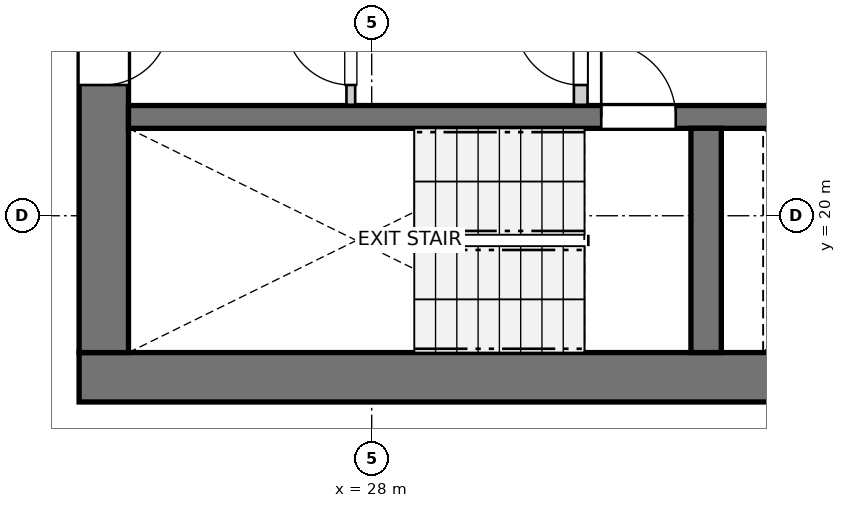
"""IFC4 building model, lengths in metres.
Left out: names, types, materials, properties, quantities, classifications, styles, units other than length and angle.
Written with IfcOpenShell. Run it as: python <this file> out.ifc"""

import sys

from ifc_helpers import new_model, si_unit, direction, frame, frame_2d, origin, place, context, subcontext, project, spatial, rectangle, extrude, source, transform, mapped, element, fill, save


model = new_model("IFC4")
c1 = context("Model", 3, precision=1e-05, world=origin(), true_north=direction((0.0, 1.0)))
c2 = subcontext(c1, "Body", "Model", "MODEL_VIEW")
j1 = project(units=[si_unit("LENGTHUNIT", "METRE"), si_unit("PLANEANGLEUNIT", "RADIAN")], contexts=[c1])
p1 = place(None, origin())
s1 = spatial("IfcSite", under=j1, at=p1, CompositionType="ELEMENT")
p2 = place(p1, origin())
s2 = spatial("IfcBuilding", under=s1, at=p2, CompositionType="ELEMENT")
p3 = place(p2, frame((0.0, 0.0, 86.4)))
s3 = spatial("IfcBuildingStorey", under=s2, at=p3, CompositionType="ELEMENT", Elevation=86.4)
p4 = place(p3, frame((24.15, 17.875, 0.0), z_axis=(0.0, 0.0, 1.0), x_axis=(1.0, 0.0, 0.0)))
e1 = element("IfcWall", 1, at=p4, inside=s3, PredefinedType="SHEAR", context=c2, shape_type="SweptSolid", body=[
    extrude(rectangle(XDim=12.4, YDim=0.65, at=frame_2d((6.2, 0.0))), origin(), (0.0, 0.0, 1.0), 2.95),
])
p5 = place(p3, frame((24.475, 33.8, 0.0), z_axis=(0.0, 0.0, 1.0), x_axis=(0.0, -1.0, 0.0)))
e2 = element("IfcWall", 2, at=p5, inside=s3, PredefinedType="SHEAR", context=c2, shape_type="SweptSolid", body=[
    extrude(rectangle(XDim=15.6, YDim=0.65, at=frame_2d((7.8, 0.0))), origin(), (0.0, 0.0, 1.0), 2.95),
])
p6 = place(p5, frame((7.05, 0.0, 0.0)))
e3 = element("IfcOpeningElement", 3, at=p6, cuts=e2, PredefinedType="OPENING", context=c2, shape_type="SweptSolid", body=[
    extrude(rectangle(XDim=1.5, YDim=2.15, at=frame_2d((0.75, 1.075))), frame((0.0, 0.335, 0.0), z_axis=(0.0, -1.0, 0.0), x_axis=(1.0, 0.0, 0.0)), (0.0, 0.0, 1.0), 0.67),
])
p7 = place(p5, frame((3.52, 0.0, 0.0)))
e4 = element("IfcOpeningElement", 4, at=p7, cuts=e2, PredefinedType="OPENING", context=c2, shape_type="SweptSolid", body=[
    extrude(rectangle(XDim=0.86, YDim=2.05, at=frame_2d((0.43, 1.025))), frame((0.0, 0.335, 0.0), z_axis=(0.0, -1.0, 0.0), x_axis=(1.0, 0.0, 0.0)), (0.0, 0.0, 1.0), 0.67),
])
p8 = place(p5, frame((11.22, 0.0, 0.0)))
e5 = element("IfcOpeningElement", 5, at=p8, cuts=e2, PredefinedType="OPENING", context=c2, shape_type="SweptSolid", body=[
    extrude(rectangle(XDim=0.86, YDim=2.05, at=frame_2d((0.43, 1.025))), frame((0.0, 0.335, 0.0), z_axis=(0.0, -1.0, 0.0), x_axis=(1.0, 0.0, 0.0)), (0.0, 0.0, 1.0), 0.67),
])
p9 = place(p3, frame((24.8, 21.3, 0.0), z_axis=(0.0, 0.0, 1.0), x_axis=(1.0, 0.0, 0.0)))
e6 = element("IfcWall", 6, at=p9, inside=s3, PredefinedType="SHEAR", context=c2, shape_type="SweptSolid", body=[
    extrude(rectangle(XDim=11.1, YDim=0.3, at=frame_2d((5.55, 0.0))), origin(), (0.0, 0.0, 1.0), 2.95),
])
p10 = place(p9, frame((6.22, 0.0, 0.0)))
e7 = element("IfcOpeningElement", 7, at=p10, cuts=e6, PredefinedType="OPENING", context=c2, shape_type="SweptSolid", body=[
    extrude(rectangle(XDim=0.98, YDim=2.15, at=frame_2d((0.49, 1.075))), frame((0.0, 0.16, 0.0), z_axis=(0.0, -1.0, 0.0), x_axis=(1.0, 0.0, 0.0)), (0.0, 0.0, 1.0), 0.32),
])
p11 = place(p9, frame((9.15, 0.0, 0.0)))
e8 = element("IfcOpeningElement", 8, at=p11, cuts=e6, PredefinedType="OPENING", context=c2, shape_type="SweptSolid", body=[
    extrude(rectangle(XDim=1.15, YDim=2.15, at=frame_2d((0.575, 1.075))), frame((0.0, 0.16, 0.0), z_axis=(0.0, -1.0, 0.0), x_axis=(1.0, 0.0, 0.0)), (0.0, 0.0, 1.0), 0.32),
])
p12 = place(p3, frame((32.4, 18.2, 0.0), z_axis=(0.0, 0.0, 1.0), x_axis=(0.0, 1.0, 0.0)))
e9 = element("IfcWall", 9, at=p12, inside=s3, PredefinedType="SHEAR", context=c2, shape_type="SweptSolid", body=[
    extrude(rectangle(XDim=2.95, YDim=0.4, at=frame_2d((1.475, 0.0))), origin(), (0.0, 0.0, 1.0), 2.95),
])
p13 = place(p3, frame((30.75, 21.46, 0.0), z_axis=(0.0, 0.0, 1.0), x_axis=(0.0, 1.0, 0.0)))
e10 = element("IfcWall", 10, at=p13, inside=s3, PredefinedType="PARTITIONING", context=c2, shape_type="SweptSolid", body=[
    extrude(rectangle(XDim=3.11, YDim=0.18, at=frame_2d((1.555, 0.0))), origin(), (0.0, 0.0, 1.0), 2.95),
])
p14 = place(p13, frame((0.26, 0.0, 0.0)))
e11 = element("IfcOpeningElement", 11, at=p14, cuts=e10, PredefinedType="OPENING", context=c2, shape_type="SweptSolid", body=[
    extrude(rectangle(XDim=0.86, YDim=2.05, at=frame_2d((0.43, 1.025))), frame((0.0, 0.1, 0.0), z_axis=(0.0, -1.0, 0.0), x_axis=(1.0, 0.0, 0.0)), (0.0, 0.0, 1.0), 0.2),
])
p15 = place(p3, frame((27.725, 21.46, 0.0), z_axis=(0.0, 0.0, 1.0), x_axis=(0.0, 1.0, 0.0)))
e12 = element("IfcWall", 12, at=p15, inside=s3, PredefinedType="PARTITIONING", context=c2, shape_type="SweptSolid", body=[
    extrude(rectangle(XDim=1.38, YDim=0.115, at=frame_2d((0.69, 0.0))), origin(), (0.0, 0.0, 1.0), 2.95),
])
p16 = place(p15, frame((0.26, 0.0, 0.0)))
e13 = element("IfcOpeningElement", 13, at=p16, cuts=e12, PredefinedType="OPENING", context=c2, shape_type="SweptSolid", body=[
    extrude(rectangle(XDim=0.86, YDim=2.05, at=frame_2d((0.43, 1.025))), frame((0.0, 0.067, 0.0), z_axis=(0.0, -1.0, 0.0), x_axis=(1.0, 0.0, 0.0)), (0.0, 0.0, 1.0), 0.135),
])
m1 = source(origin(), c2, "Body", "SweptSolid", [
    extrude(rectangle(XDim=0.98, YDim=2.15, at=frame_2d((0.49, 1.075))), frame((0.0, 0.025, 0.0), z_axis=(0.0, -1.0, 0.0), x_axis=(1.0, 0.0, 0.0)), (0.0, 0.0, 1.0), 0.05),
])
p17 = place(p10, origin())
e14 = element("IfcDoor", 14, at=p17, inside=s3, OperationType="SINGLE_SWING_LEFT", PredefinedType="DOOR", context=c2, shape_type="MappedRepresentation", body=[
    mapped(m1, transform((0.0, 0.0, 0.0), x_axis=(1.0, 0.0, 0.0), y_axis=(0.0, 1.0, 0.0), z_axis=(0.0, 0.0, 1.0), scale=1.0)),
])
fill(e7, e14)
m2 = source(origin(), c2, "Body", "SweptSolid", [
    extrude(rectangle(XDim=0.86, YDim=2.05, at=frame_2d((0.43, 1.025))), frame((0.0, 0.025, 0.0), z_axis=(0.0, -1.0, 0.0), x_axis=(1.0, 0.0, 0.0)), (0.0, 0.0, 1.0), 0.05),
])
p18 = place(p8, origin())
e15 = element("IfcDoor", 15, at=p18, inside=s3, OperationType="SINGLE_SWING_LEFT", PredefinedType="DOOR", context=c2, shape_type="MappedRepresentation", body=[
    mapped(m2, transform((0.0, 0.0, 0.0), x_axis=(1.0, 0.0, 0.0), y_axis=(0.0, 1.0, 0.0), z_axis=(0.0, 0.0, 1.0), scale=1.0)),
])
fill(e5, e15)
p19 = place(p14, origin())
e16 = element("IfcDoor", 16, at=p19, inside=s3, OperationType="SINGLE_SWING_RIGHT", PredefinedType="DOOR", context=c2, shape_type="MappedRepresentation", body=[
    mapped(m2, transform((0.0, 0.0, 0.0), x_axis=(1.0, 0.0, 0.0), y_axis=(0.0, 1.0, 0.0), z_axis=(0.0, 0.0, 1.0), scale=1.0)),
])
fill(e11, e16)
p20 = place(p16, origin())
e17 = element("IfcDoor", 17, at=p20, inside=s3, OperationType="SINGLE_SWING_RIGHT", PredefinedType="DOOR", context=c2, shape_type="MappedRepresentation", body=[
    mapped(m2, transform((0.0, 0.0, 0.0), x_axis=(1.0, 0.0, 0.0), y_axis=(0.0, 1.0, 0.0), z_axis=(0.0, 0.0, 1.0), scale=1.0)),
])
fill(e13, e17)
save(model, sys.argv[1])
